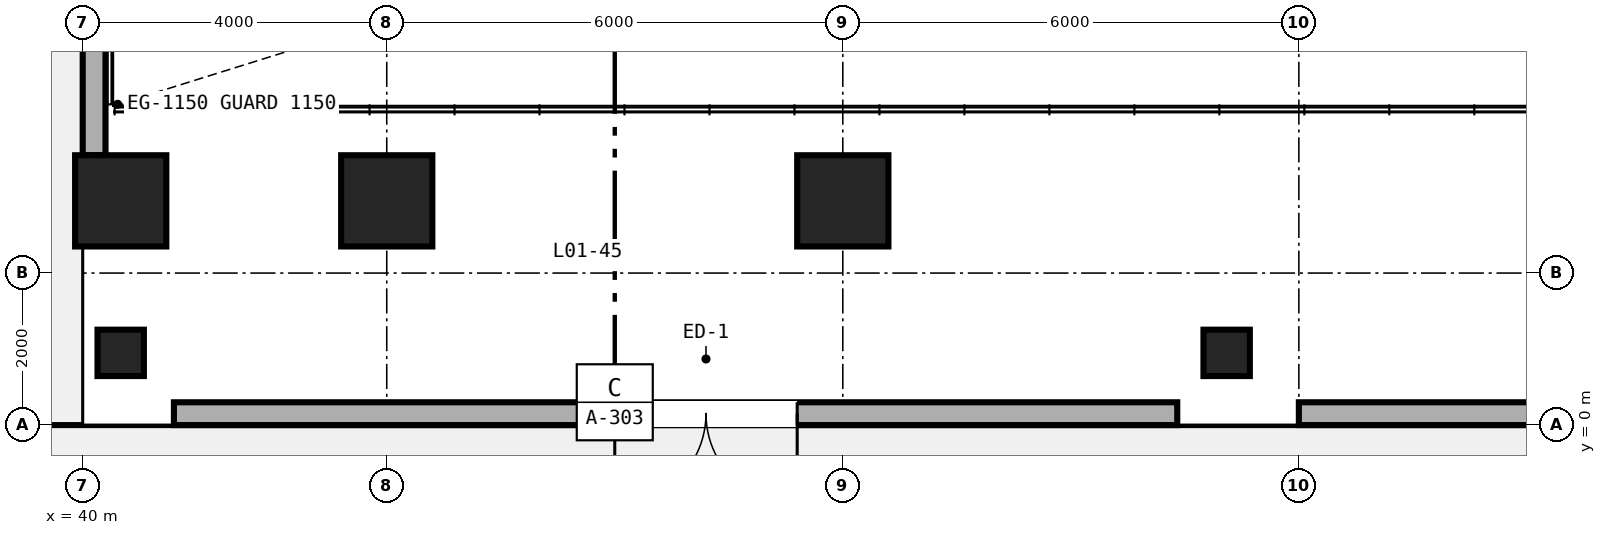
"""IFC4 building model, lengths in metres.
Left out: names, types, materials, properties, quantities, classifications, styles, units other than length and angle.
Written with IfcOpenShell. Run it as: python <this file> out.ifc"""

import sys

from ifc_helpers import new_model, si_unit, direction, frame, frame_2d, origin, origin_2d, place, context, subcontext, project, spatial, rectangle, hollow_circle, extrude, source, transform, mapped, element, fill, save


model = new_model("IFC4")
c1 = context("Model", 3, precision=1e-05, world=origin(), true_north=direction((0.0, 1.0)))
c2 = subcontext(c1, "Body", "Model", "MODEL_VIEW")
j1 = project(units=[si_unit("LENGTHUNIT", "METRE"), si_unit("PLANEANGLEUNIT", "RADIAN")], contexts=[c1])
p1 = place(None, origin())
s1 = spatial("IfcSite", under=j1, at=p1, CompositionType="ELEMENT")
p2 = place(p1, origin())
s2 = spatial("IfcBuilding", under=s1, at=p2, CompositionType="ELEMENT")
p3 = place(p2, origin())
s3 = spatial("IfcBuildingStorey", under=s2, at=p3, CompositionType="ELEMENT", Elevation=0.0)
m1 = source(origin(), c2, "Body", "SweptSolid", [
    extrude(hollow_circle(Radius=0.305, WallThickness=0.025, at=origin_2d()), origin(), (0.0, 0.0, 1.0), 5.71),
])
for number, where, z_axis, x_axis in (
    (1, (40.5, 0.95, 0.0), (0.0, 0.0, 1.0), (1.0, 0.0, 0.0)),
    (2, (55.05, 0.95, 0.0), (0.0, 0.0, 1.0), (1.0, 0.0, 0.0)),
):
    element("IfcColumn", number, at=place(p3, frame(where, z_axis=z_axis, x_axis=x_axis)), inside=s3, PredefinedType="COLUMN", context=c2, shape_type="MappedRepresentation", body=[
        mapped(m1, transform((0.0, 0.0, 0.0), scale=1.0)),
    ])
m2 = source(origin(), c2, "Body", "SweptSolid", [
    extrude(rectangle(XDim=1.2, YDim=1.2, at=origin_2d()), origin(), (0.0, 0.0, 1.0), 5.71),
])
for number, where, z_axis, x_axis in (
    (3, (40.5, 2.95, 0.0), (0.0, 0.0, 1.0), (1.0, 0.0, 0.0)),
    (4, (44.0, 2.95, 0.0), (0.0, 0.0, 1.0), (1.0, 0.0, 0.0)),
    (5, (50.0, 2.95, 0.0), (0.0, 0.0, 1.0), (1.0, 0.0, 0.0)),
):
    element("IfcColumn", number, at=place(p3, frame(where, z_axis=z_axis, x_axis=x_axis)), inside=s3, PredefinedType="COLUMN", context=c2, shape_type="MappedRepresentation", body=[
        mapped(m2, transform((0.0, 0.0, 0.0), scale=1.0)),
    ])
p4 = place(p3, frame((63.65, 0.15, 0.0), z_axis=(0.0, 0.0, 1.0), x_axis=(-1.0, 0.0, 0.0)))
e6 = element("IfcWall", 6, at=p4, inside=s3, PredefinedType="SOLIDWALL", context=c2, shape_type="SweptSolid", body=[
    extrude(rectangle(XDim=7.65, YDim=0.3, at=frame_2d((3.825, 0.0))), origin(), (0.0, 0.0, 1.0), 5.71),
])
p5 = place(p3, frame((54.4, 0.15, 0.0), z_axis=(0.0, 0.0, 1.0), x_axis=(-1.0, 0.0, 0.0)))
e7 = element("IfcWall", 7, at=p5, inside=s3, PredefinedType="SOLIDWALL", context=c2, shape_type="SweptSolid", body=[
    extrude(rectangle(XDim=13.2, YDim=0.3, at=frame_2d((6.6, 0.0))), origin(), (0.0, 0.0, 1.0), 5.71),
])
p6 = place(p5, frame((5.0, 0.0, 0.0)))
e8 = element("IfcOpeningElement", 8, at=p6, cuts=e7, PredefinedType="OPENING", context=c2, shape_type="SweptSolid", body=[
    extrude(rectangle(XDim=2.4, YDim=2.6, at=frame_2d((1.2, 1.3))), frame((0.0, 0.16, 0.0), z_axis=(0.0, -1.0, 0.0), x_axis=(1.0, 0.0, 0.0)), (0.0, 0.0, 1.0), 0.32),
])
p7 = place(p3, frame((40.15, 3.55, 0.0), z_axis=(0.0, 0.0, 1.0), x_axis=(0.0, 1.0, 0.0)))
e9 = element("IfcWall", 9, at=p7, inside=s3, PredefinedType="SOLIDWALL", context=c2, shape_type="SweptSolid", body=[
    extrude(rectangle(XDim=10.4, YDim=0.3, at=frame_2d((5.2, 0.0))), origin(), (0.0, 0.0, 1.0), 4.931),
])
p8 = place(p7, frame((7.8, 0.0, 0.0)))
e10 = element("IfcOpeningElement", 10, at=p8, cuts=e9, PredefinedType="OPENING", context=c2, shape_type="SweptSolid", body=[
    extrude(rectangle(XDim=2.4, YDim=2.6, at=frame_2d((1.2, 1.3))), frame((0.0, 0.16, 0.0), z_axis=(0.0, -1.0, 0.0), x_axis=(1.0, 0.0, 0.0)), (0.0, 0.0, 1.0), 0.32),
])
m3 = source(origin(), c2, "Body", "SweptSolid", [
    extrude(rectangle(XDim=2.4, YDim=2.6, at=frame_2d((1.2, 1.3))), frame((0.0, 0.025, 0.0), z_axis=(0.0, -1.0, 0.0), x_axis=(1.0, 0.0, 0.0)), (0.0, 0.0, 1.0), 0.05),
])
p9 = place(p6, origin())
e11 = element("IfcDoor", 11, at=p9, inside=s3, OperationType="DOUBLE_DOOR_SINGLE_SWING", PredefinedType="DOOR", context=c2, shape_type="MappedRepresentation", body=[
    mapped(m3, transform((0.0, 0.0, 0.0), scale=1.0)),
])
fill(e8, e11)
save(model, sys.argv[1])
